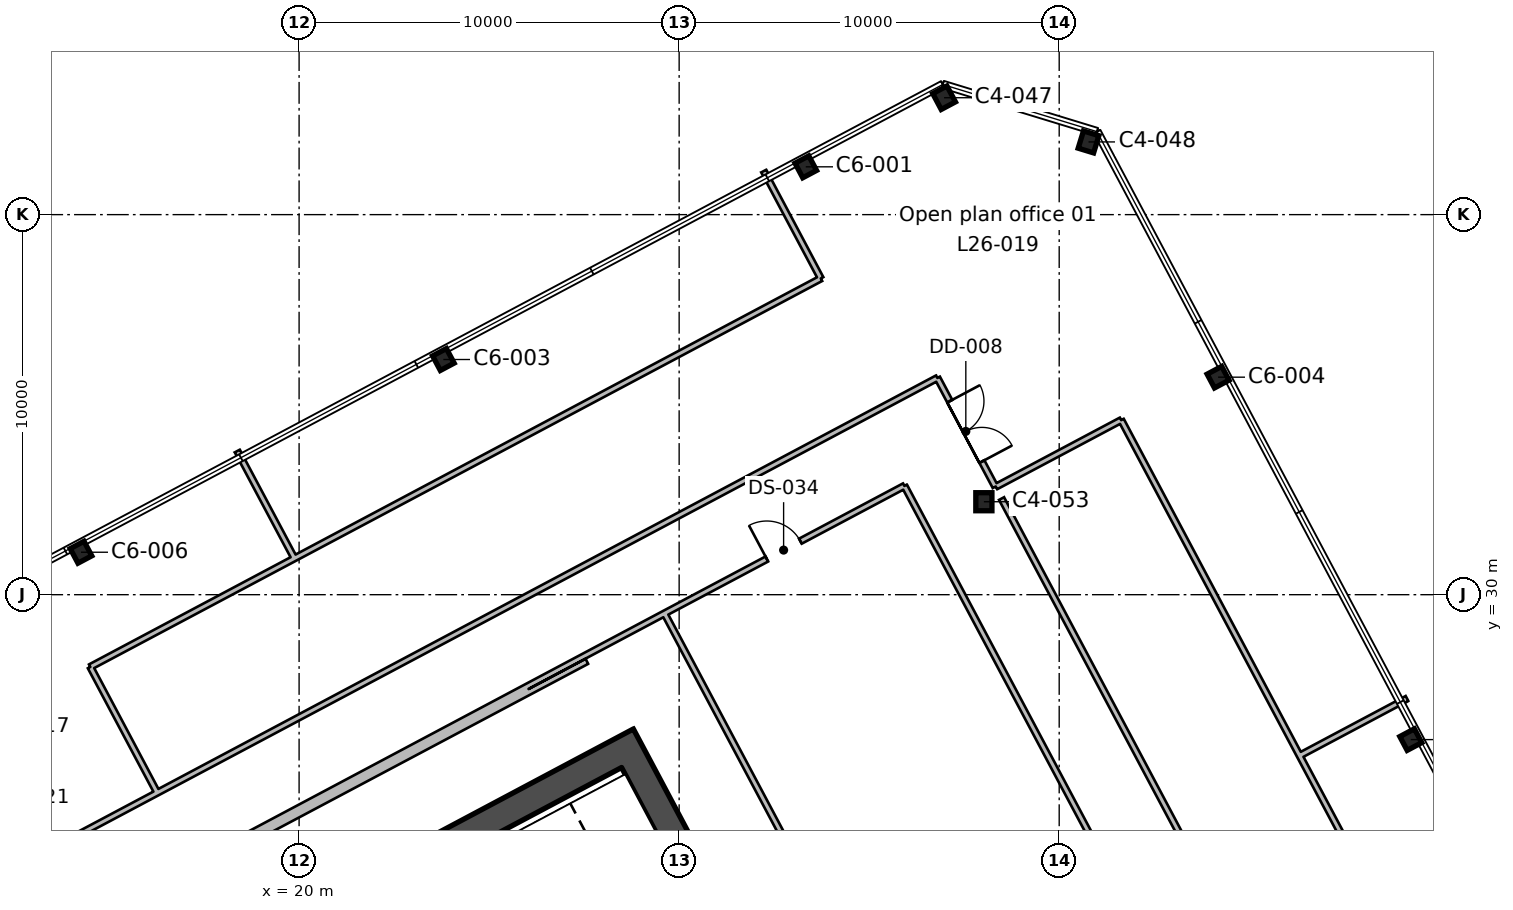
"""IFC4 building model, lengths in metres.
Left out: names, types, materials, properties, quantities, classifications, styles, units other than length and angle.
Written with IfcOpenShell. Run it as: python <this file> out.ifc"""

import sys

from ifc_helpers import new_model, si_unit, direction, frame, frame_2d, origin, origin_2d, place, context, subcontext, project, spatial, rectangle, i_section, extrude, element, fill, save


model = new_model("IFC4")
c1 = context("Model", 3, precision=1e-05, world=origin(), true_north=direction((0.0, 1.0)))
c2 = subcontext(c1, "Body", "Model", "MODEL_VIEW")
j1 = project(units=[si_unit("LENGTHUNIT", "METRE"), si_unit("PLANEANGLEUNIT", "RADIAN")], contexts=[c1])
p1 = place(None, origin())
s1 = spatial("IfcSite", under=j1, at=p1, CompositionType="ELEMENT")
p2 = place(p1, origin())
s2 = spatial("IfcBuilding", under=s1, at=p2, CompositionType="ELEMENT")
p3 = place(p2, frame((0.0, 0.0, 130.2)))
s3 = spatial("IfcBuildingStorey", under=s2, at=p3, CompositionType="ELEMENT", Elevation=130.2)
for number, where, z_axis, x_axis in (
    (1, (49.251, 26.187, 0.0), (0.0, 0.0, 1.0), (-0.469, 0.883, 0.0)),
    (2, (14.261, 31.117, 0.0), (0.0, 0.0, 1.0), (-0.883, -0.469, 0.0)),
):
    element("IfcColumn", number, at=place(p3, frame(where, z_axis=z_axis, x_axis=x_axis)), inside=s3, PredefinedType="COLUMN", context=c2, shape_type="SweptSolid", body=[
        extrude(i_section(OverallWidth=0.412, OverallDepth=0.434, WebThickness=0.036, FlangeThickness=0.057, FilletRadius=0.015, at=origin_2d()), origin(), (0.0, 0.0, 1.0), 4.0),
    ])
p4 = place(p3, frame((38.018, 32.446, 0.0), z_axis=(0.0, 0.0, 1.0), x_axis=(1.0, 0.0, 0.0)))
e3 = element("IfcColumn", 3, at=p4, inside=s3, PredefinedType="COLUMN", context=c2, shape_type="SweptSolid", body=[
    extrude(i_section(OverallWidth=0.424, OverallDepth=0.475, WebThickness=0.048, FlangeThickness=0.077, FilletRadius=0.015, at=origin_2d()), origin(), (0.0, 0.0, 1.0), 4.0),
])
for number, where, z_axis, x_axis in (
    (4, (44.181, 35.723, 0.0), (0.0, 0.0, 1.0), (-0.469, 0.883, 0.0)),
    (5, (23.796, 36.188, 0.0), (0.0, 0.0, 1.0), (-0.883, -0.469, 0.0)),
    (6, (33.332, 41.258, 0.0), (0.0, 0.0, 1.0), (-0.883, -0.469, 0.0)),
):
    element("IfcColumn", number, at=place(p3, frame(where, z_axis=z_axis, x_axis=x_axis)), inside=s3, PredefinedType="COLUMN", context=c2, shape_type="SweptSolid", body=[
        extrude(i_section(OverallWidth=0.412, OverallDepth=0.434, WebThickness=0.036, FlangeThickness=0.057, FilletRadius=0.015, at=origin_2d()), origin(), (0.0, 0.0, 1.0), 4.0),
    ])
for number, where, z_axis, x_axis in (
    (7, (40.772, 41.913, 0.0), (0.0, 0.0, 1.0), (-0.956, 0.292, 0.0)),
    (8, (36.971, 43.076, 0.0), (0.0, 0.0, 1.0), (-0.883, -0.469, 0.0)),
):
    element("IfcColumn", number, at=place(p3, frame(where, z_axis=z_axis, x_axis=x_axis)), inside=s3, PredefinedType="COLUMN", context=c2, shape_type="SweptSolid", body=[
        extrude(i_section(OverallWidth=0.424, OverallDepth=0.475, WebThickness=0.048, FlangeThickness=0.077, FilletRadius=0.015, at=origin_2d()), origin(), (0.0, 0.0, 1.0), 4.0),
    ])
p5 = place(p3, frame((37.713, 8.896, 0.0), z_axis=(0.0, 0.0, 1.0), x_axis=(-0.469469918705, 0.88294846703, 0.0)))
e9 = element("IfcWall", 9, at=p5, inside=s3, PredefinedType="SHEAR", context=c2, shape_type="SweptSolid", body=[
    extrude(rectangle(XDim=19.7, YDim=0.75, at=frame_2d((9.85, 0.0))), origin(), (0.0, 0.0, 1.0), 4.0),
])
p6 = place(p5, frame((10.45, 0.0, 0.0)))
e10 = element("IfcOpeningElement", 10, at=p6, cuts=e9, PredefinedType="OPENING", context=c2, shape_type="SweptSolid", body=[
    extrude(rectangle(XDim=2.4, YDim=2.4, at=frame_2d((1.2, 1.2))), frame((0.0, 0.385, 0.0), z_axis=(0.0, -1.0, 0.0), x_axis=(1.0, 0.0, 0.0)), (0.0, 0.0, 1.0), 0.77),
])
p7 = place(p3, frame((10.474, 16.3, 0.0), z_axis=(0.0, 0.0, 1.0), x_axis=(0.88295010195, 0.469466843842, 0.0)))
e11 = element("IfcWall", 11, at=p7, inside=s3, PredefinedType="SHEAR", context=c2, shape_type="SweptSolid", body=[
    extrude(rectangle(XDim=20.2, YDim=0.75, at=frame_2d((10.1, 0.0))), origin(), (0.0, 0.0, 1.0), 4.0),
])
p8 = place(p3, frame((0.0, 16.139, 0.0), z_axis=(0.0, 0.0, 1.0), x_axis=(0.882958532279, 0.469450988151, 0.0)))
e12 = element("IfcWall", 12, at=p8, inside=s3, PredefinedType="PARTITIONING", context=c2, shape_type="SweptSolid", body=[
    extrude(rectangle(XDim=18.648, YDim=0.15, at=frame_2d((9.324, 0.0))), origin(), (0.0, 0.0, 1.0), 3.64),
])
p9 = place(p8, frame((14.25, 0.0, 0.0)))
e13 = element("IfcOpeningElement", 13, at=p9, cuts=e12, PredefinedType="OPENING", context=c2, shape_type="SweptSolid", body=[
    extrude(rectangle(XDim=1.0, YDim=2.1, at=frame_2d((0.5, 1.05))), frame((0.0, 0.085, 0.0), z_axis=(0.0, -1.0, 0.0), x_axis=(1.0, 0.0, 0.0)), (0.0, 0.0, 1.0), 0.17),
])
p10 = place(p3, frame((14.507, 28.1, 0.0), z_axis=(0.0, 0.0, 1.0), x_axis=(0.469217340227, -0.883082718453, 0.0)))
e14 = element("IfcWall", 14, at=p10, inside=s3, PredefinedType="PARTITIONING", context=c2, shape_type="SweptSolid", body=[
    extrude(rectangle(XDim=3.736, YDim=0.15, at=frame_2d((1.868, 0.0))), origin(), (0.0, 0.0, 1.0), 3.64),
])
p11 = place(p3, frame((14.506, 28.099, 0.0), z_axis=(0.0, 0.0, 1.0), x_axis=(0.882951640414, 0.469463950363, 0.0)))
e15 = element("IfcWall", 15, at=p11, inside=s3, PredefinedType="PARTITIONING", context=c2, shape_type="SweptSolid", body=[
    extrude(rectangle(XDim=6.032, YDim=0.15, at=frame_2d((3.016, 0.0))), origin(), (0.0, 0.0, 1.0), 3.64),
])
p12 = place(p3, frame((38.318, 32.84, 0.0), z_axis=(0.0, 0.0, 1.0), x_axis=(-0.469716602495, 0.882817259313, 0.0)))
e16 = element("IfcWall", 16, at=p12, inside=s3, PredefinedType="PARTITIONING", context=c2, shape_type="SweptSolid", body=[
    extrude(rectangle(XDim=3.243, YDim=0.15, at=frame_2d((1.621, 0.0))), origin(), (0.0, 0.0, 1.0), 3.64),
])
p13 = place(p12, frame((0.75, 0.0, 0.0)))
e17 = element("IfcOpeningElement", 17, at=p13, cuts=e16, PredefinedType="OPENING", context=c2, shape_type="SweptSolid", body=[
    extrude(rectangle(XDim=1.8, YDim=2.1, at=frame_2d((0.9, 1.05))), frame((0.0, 0.085, 0.0), z_axis=(0.0, -1.0, 0.0), x_axis=(1.0, 0.0, 0.0)), (0.0, 0.0, 1.0), 0.17),
])
p14 = place(p3, frame((36.795, 35.703, 0.0), z_axis=(0.0, 0.0, 1.0), x_axis=(-0.882943092456, -0.469480026716, 0.0)))
e18 = element("IfcWall", 18, at=p14, inside=s3, PredefinedType="PARTITIONING", context=c2, shape_type="SweptSolid", body=[
    extrude(rectangle(XDim=23.025, YDim=0.15, at=frame_2d((11.513, 0.0))), origin(), (0.0, 0.0, 1.0), 3.64),
])
p15 = place(p3, frame((18.374, 33.78, 0.0), z_axis=(0.0, 0.0, 1.0), x_axis=(0.469685095616, -0.882834022315, 0.0)))
e19 = element("IfcWall", 19, at=p15, inside=s3, PredefinedType="PARTITIONING", context=c2, shape_type="SweptSolid", body=[
    extrude(rectangle(XDim=3.2, YDim=0.15, at=frame_2d((1.6, 0.0))), origin(), (0.0, 0.0, 1.0), 3.64),
])
p16 = place(p3, frame((19.832, 30.931, 0.0), z_axis=(0.0, 0.0, 1.0), x_axis=(0.88293368678, 0.469497715382, 0.0)))
e20 = element("IfcWall", 20, at=p16, inside=s3, PredefinedType="PARTITIONING", context=c2, shape_type="SweptSolid", body=[
    extrude(rectangle(XDim=15.739, YDim=0.15, at=frame_2d((7.869, 0.0))), origin(), (0.0, 0.0, 1.0), 3.64),
])
p17 = place(p3, frame((33.728, 38.32, 0.0), z_axis=(0.0, 0.0, 1.0), x_axis=(-0.469320691295, 0.883027796121, 0.0)))
e21 = element("IfcWall", 21, at=p17, inside=s3, PredefinedType="PARTITIONING", context=c2, shape_type="SweptSolid", body=[
    extrude(rectangle(XDim=3.2, YDim=0.15, at=frame_2d((1.6, 0.0))), origin(), (0.0, 0.0, 1.0), 3.64),
])
p18 = place(p3, frame((29.614, 29.507, 0.0), z_axis=(0.0, 0.0, 1.0), x_axis=(0.882989239747, 0.469393227998, 0.0)))
e22 = element("IfcWall", 22, at=p18, inside=s3, PredefinedType="PARTITIONING", context=c2, shape_type="SweptSolid", body=[
    extrude(rectangle(XDim=7.15, YDim=0.15, at=frame_2d((3.575, 0.0))), origin(), (0.0, 0.0, 1.0), 3.64),
])
p19 = place(p18, frame((3.05, 0.0, 0.0)))
e23 = element("IfcOpeningElement", 23, at=p19, cuts=e22, PredefinedType="OPENING", context=c2, shape_type="SweptSolid", body=[
    extrude(rectangle(XDim=1.0, YDim=2.1, at=frame_2d((0.5, 1.05))), frame((0.0, 0.085, 0.0), z_axis=(0.0, -1.0, 0.0), x_axis=(1.0, 0.0, 0.0)), (0.0, 0.0, 1.0), 0.17),
])
p20 = place(p3, frame((35.927, 32.863, 0.0), z_axis=(0.0, 0.0, 1.0), x_axis=(0.469478059645, -0.882944138387, 0.0)))
e24 = element("IfcWall", 24, at=p20, inside=s3, PredefinedType="PARTITIONING", context=c2, shape_type="SweptSolid", body=[
    extrude(rectangle(XDim=22.299, YDim=0.15, at=frame_2d((11.15, 0.0))), origin(), (0.0, 0.0, 1.0), 3.64),
])
p21 = place(p3, frame((29.614, 29.507, 0.0), z_axis=(0.0, 0.0, 1.0), x_axis=(-0.88294370404, -0.469478876518, 0.0)))
e25 = element("IfcWall", 25, at=p21, inside=s3, PredefinedType="PARTITIONING", context=c2, shape_type="SweptSolid", body=[
    extrude(rectangle(XDim=33.456, YDim=0.15, at=frame_2d((16.728, 0.0))), origin(), (0.0, 0.0, 1.0), 3.64),
])
p22 = place(p3, frame((8.84, 18.296, 0.0), z_axis=(0.0, 0.0, 1.0), x_axis=(0.883138072777, 0.469113146705, 0.0)))
e26 = element("IfcWall", 26, at=p22, inside=s3, PredefinedType="PARTITIONING", context=c2, shape_type="SweptSolid", body=[
    extrude(rectangle(XDim=21.211, YDim=0.15, at=frame_2d((10.605, 0.0))), origin(), (0.0, 0.0, 1.0), 3.64),
])
p23 = place(p3, frame((40.083, 9.817, 0.0), z_axis=(0.0, 0.0, 1.0), x_axis=(-0.469455368788, 0.88295620317, 0.0)))
e27 = element("IfcWall", 27, at=p23, inside=s3, PredefinedType="PARTITIONING", context=c2, shape_type="SweptSolid", body=[
    extrude(rectangle(XDim=22.3, YDim=0.15, at=frame_2d((11.15, 0.0))), origin(), (0.0, 0.0, 1.0), 3.64),
])
p24 = place(p3, frame((46.081, 26.226, 0.0), z_axis=(0.0, 0.0, 1.0), x_axis=(-0.469444635522, 0.882961909812, 0.0)))
e28 = element("IfcWall", 28, at=p24, inside=s3, PredefinedType="PARTITIONING", context=c2, shape_type="SweptSolid", body=[
    extrude(rectangle(XDim=9.477, YDim=0.15, at=frame_2d((4.739, 0.0))), origin(), (0.0, 0.0, 1.0), 3.64),
])
p25 = place(p3, frame((41.632, 34.594, 0.0), z_axis=(0.0, 0.0, 1.0), x_axis=(-0.883031968756, -0.46931284039, 0.0)))
e29 = element("IfcWall", 29, at=p25, inside=s3, PredefinedType="PARTITIONING", context=c2, shape_type="SweptSolid", body=[
    extrude(rectangle(XDim=3.737, YDim=0.15, at=frame_2d((1.869, 0.0))), origin(), (0.0, 0.0, 1.0), 3.64),
])
p26 = place(p3, frame((38.483, 32.529, 0.0), z_axis=(0.0, 0.0, 1.0), x_axis=(0.469465364691, -0.882950888416, 0.0)))
e30 = element("IfcWall", 30, at=p26, inside=s3, PredefinedType="PARTITIONING", context=c2, shape_type="SweptSolid", body=[
    extrude(rectangle(XDim=22.905, YDim=0.15, at=frame_2d((11.453, 0.0))), origin(), (0.0, 0.0, 1.0), 3.64),
])
p27 = place(p3, frame((46.081, 26.226, 0.0), z_axis=(0.0, 0.0, 1.0), x_axis=(0.469497962096, -0.88293355559, 0.0)))
e31 = element("IfcWall", 31, at=p27, inside=s3, PredefinedType="PARTITIONING", context=c2, shape_type="SweptSolid", body=[
    extrude(rectangle(XDim=20.032, YDim=0.15, at=frame_2d((10.016, 0.0))), origin(), (0.0, 0.0, 1.0), 3.64),
])
p28 = place(p3, frame((49.152, 27.268, 0.0), z_axis=(0.0, 0.0, 1.0), x_axis=(-0.882819217955, -0.469712921271, 0.0)))
e32 = element("IfcWall", 32, at=p28, inside=s3, PredefinedType="PARTITIONING", context=c2, shape_type="SweptSolid", body=[
    extrude(rectangle(XDim=3.2, YDim=0.15, at=frame_2d((1.6, 0.0))), origin(), (0.0, 0.0, 1.0), 3.64),
])
p29 = place(p13, frame((1.8, 0.0, 0.0), z_axis=(0.0, 0.0, 1.0), x_axis=(-1.0, 0.0, 0.0)))
e33 = element("IfcDoor", 33, at=p29, inside=s3, OperationType="DOUBLE_DOOR_SINGLE_SWING", PredefinedType="DOOR", context=c2, shape_type="SweptSolid", body=[
    extrude(rectangle(XDim=1.8, YDim=2.1, at=frame_2d((0.9, 1.05))), frame((0.0, 0.025, 0.0), z_axis=(0.0, -1.0, 0.0), x_axis=(1.0, 0.0, 0.0)), (0.0, 0.0, 1.0), 0.05),
])
fill(e17, e33)
p30 = place(p19, origin())
e34 = element("IfcDoor", 34, at=p30, inside=s3, OperationType="SINGLE_SWING_LEFT", PredefinedType="DOOR", context=c2, shape_type="SweptSolid", body=[
    extrude(rectangle(XDim=1.0, YDim=2.1, at=frame_2d((0.5, 1.05))), frame((0.0, 0.025, 0.0), z_axis=(0.0, -1.0, 0.0), x_axis=(1.0, 0.0, 0.0)), (0.0, 0.0, 1.0), 0.05),
])
fill(e23, e34)
save(model, sys.argv[1])
